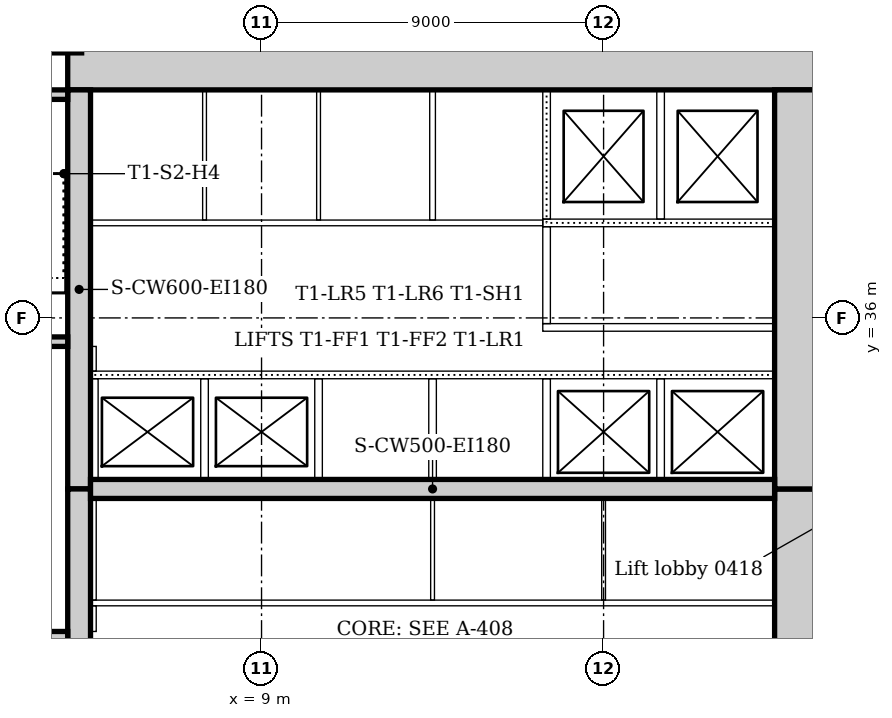
"""IFC4 building model, lengths in metres.
Left out: names, types, materials, properties, quantities, classifications, styles, units other than length and angle.
Written with IfcOpenShell. Run it as: python <this file> out.ifc"""

import sys

from ifc_helpers import new_model, si_unit, direction, frame, frame_2d, origin, origin_2d, place, context, subcontext, project, spatial, rectangle, extrude, element, fill, save


model = new_model("IFC4")
c1 = context("Model", 3, precision=1e-05, world=origin(), true_north=direction((0.0, 1.0)))
c2 = subcontext(c1, "Body", "Model", "MODEL_VIEW")
j1 = project(units=[si_unit("LENGTHUNIT", "METRE"), si_unit("PLANEANGLEUNIT", "RADIAN")], contexts=[c1])
p1 = place(None, origin())
s1 = spatial("IfcSite", under=j1, at=p1, CompositionType="ELEMENT")
p2 = place(p1, origin())
s2 = spatial("IfcBuilding", under=s1, at=p2, CompositionType="ELEMENT")
p3 = place(p2, frame((0.0, 0.0, 21.0)))
s3 = spatial("IfcBuildingStorey", under=s2, at=p3, CompositionType="ELEMENT", Elevation=21.0)
p4 = place(p3, frame((23.7, 42.6, 0.0), z_axis=(0.0, 0.0, 1.0), x_axis=(-1.0, 0.0, 0.0)))
e1 = element("IfcWall", 1, at=p4, inside=s3, PredefinedType="SOLIDWALL", context=c2, shape_type="SweptSolid", body=[
    extrude(rectangle(XDim=19.8, YDim=1.2, at=frame_2d((9.9, 0.0))), origin(), (0.0, 0.0, 1.0), 5.0),
])
p5 = place(p3, frame((23.1, 21.0, 0.0), z_axis=(0.0, 0.0, 1.0), x_axis=(0.0, 1.0, 0.0)))
e2 = element("IfcWall", 2, at=p5, inside=s3, PredefinedType="SOLIDWALL", context=c2, shape_type="SweptSolid", body=[
    extrude(rectangle(XDim=10.5, YDim=1.2, at=frame_2d((5.25, 0.0))), origin(), (0.0, 0.0, 1.0), 5.0),
])
p6 = place(p5, frame((4.35, 0.0, 0.0)))
e3 = element("IfcOpeningElement", 3, at=p6, cuts=e2, PredefinedType="OPENING", context=c2, shape_type="SweptSolid", body=[
    extrude(rectangle(XDim=1.8, YDim=2.1, at=frame_2d((0.9, 1.05))), frame((0.0, 0.61, 0.0), z_axis=(0.0, -1.0, 0.0), x_axis=(1.0, 0.0, 0.0)), (0.0, 0.0, 1.0), 1.22),
])
p7 = place(p3, frame((23.1, 31.5, 0.0), z_axis=(0.0, 0.0, 1.0), x_axis=(0.0, 1.0, 0.0)))
e4 = element("IfcWall", 4, at=p7, inside=s3, PredefinedType="SOLIDWALL", context=c2, shape_type="SweptSolid", body=[
    extrude(rectangle(XDim=10.5, YDim=1.2, at=frame_2d((5.25, 0.0))), origin(), (0.0, 0.0, 1.0), 5.0),
])
p8 = place(p7, frame((3.15, 0.0, 0.0)))
e5 = element("IfcOpeningElement", 5, at=p8, cuts=e4, PredefinedType="OPENING", context=c2, shape_type="SweptSolid", body=[
    extrude(rectangle(XDim=1.0, YDim=2.1, at=frame_2d((0.5, 1.05))), frame((0.0, 0.61, 0.0), z_axis=(0.0, -1.0, 0.0), x_axis=(1.0, 0.0, 0.0)), (0.0, 0.0, 1.0), 1.22),
])
p9 = place(p7, frame((5.2, 0.0, 0.0)))
e6 = element("IfcOpeningElement", 6, at=p9, cuts=e4, PredefinedType="OPENING", context=c2, shape_type="SweptSolid", body=[
    extrude(rectangle(XDim=1.0, YDim=2.1, at=frame_2d((0.5, 1.05))), frame((0.0, 0.61, 0.0), z_axis=(0.0, -1.0, 0.0), x_axis=(1.0, 0.0, 0.0)), (0.0, 0.0, 1.0), 1.22),
])
p10 = place(p3, frame((4.2, 42.0, 0.0), z_axis=(0.0, 0.0, 1.0), x_axis=(0.0, -1.0, 0.0)))
e7 = element("IfcWall", 7, at=p10, inside=s3, PredefinedType="SOLIDWALL", context=c2, shape_type="SweptSolid", body=[
    extrude(rectangle(XDim=10.5, YDim=0.6, at=frame_2d((5.25, 0.0))), origin(), (0.0, 0.0, 1.0), 5.0),
])
p11 = place(p10, frame((5.3, 0.0, 0.0)))
e8 = element("IfcOpeningElement", 8, at=p11, cuts=e7, PredefinedType="OPENING", context=c2, shape_type="SweptSolid", body=[
    extrude(rectangle(XDim=1.0, YDim=2.1, at=frame_2d((0.5, 1.05))), frame((0.0, 0.31, 0.0), z_axis=(0.0, -1.0, 0.0), x_axis=(1.0, 0.0, 0.0)), (0.0, 0.0, 1.0), 0.62),
])
p12 = place(p3, frame((4.2, 31.5, 0.0), z_axis=(0.0, 0.0, 1.0), x_axis=(0.0, -1.0, 0.0)))
e9 = element("IfcWall", 9, at=p12, inside=s3, PredefinedType="SOLIDWALL", context=c2, shape_type="SweptSolid", body=[
    extrude(rectangle(XDim=10.5, YDim=0.6, at=frame_2d((5.25, 0.0))), origin(), (0.0, 0.0, 1.0), 5.0),
])
p13 = place(p12, frame((4.25, 0.0, 0.0)))
e10 = element("IfcOpeningElement", 10, at=p13, cuts=e9, PredefinedType="OPENING", context=c2, shape_type="SweptSolid", body=[
    extrude(rectangle(XDim=1.0, YDim=2.1, at=frame_2d((0.5, 1.05))), frame((0.0, 0.31, 0.0), z_axis=(0.0, -1.0, 0.0), x_axis=(1.0, 0.0, 0.0)), (0.0, 0.0, 1.0), 0.62),
])
p14 = place(p3, frame((4.5, 31.5, 0.0), z_axis=(0.0, 0.0, 1.0), x_axis=(1.0, 0.0, 0.0)))
e11 = element("IfcWall", 11, at=p14, inside=s3, PredefinedType="SOLIDWALL", context=c2, shape_type="SweptSolid", body=[
    extrude(rectangle(XDim=18.0, YDim=0.5, at=frame_2d((9.0, 0.0))), origin(), (0.0, 0.0, 1.0), 5.0),
])
p15 = place(p3, frame((3.9, 27.625, 0.0), z_axis=(0.0, 0.0, 1.0), x_axis=(-1.0, 0.0, 0.0)))
e12 = element("IfcWall", 12, at=p15, inside=s3, PredefinedType="SOLIDWALL", context=c2, shape_type="SweptSolid", body=[
    extrude(rectangle(XDim=3.54, YDim=0.25, at=frame_2d((1.77, 0.0))), origin(), (0.0, 0.0, 1.0), 5.0),
])
p16 = place(p15, frame((0.4, 0.0, 0.0)))
e13 = element("IfcOpeningElement", 13, at=p16, cuts=e12, PredefinedType="OPENING", context=c2, shape_type="SweptSolid", body=[
    extrude(rectangle(XDim=1.0, YDim=2.1, at=frame_2d((0.5, 1.05))), frame((0.0, 0.135, 0.0), z_axis=(0.0, -1.0, 0.0), x_axis=(1.0, 0.0, 0.0)), (0.0, 0.0, 1.0), 0.27),
])
p17 = place(p3, frame((0.36, 35.375, 0.0), z_axis=(0.0, 0.0, 1.0), x_axis=(1.0, 0.0, 0.0)))
e14 = element("IfcWall", 14, at=p17, inside=s3, PredefinedType="SOLIDWALL", context=c2, shape_type="SweptSolid", body=[
    extrude(rectangle(XDim=3.54, YDim=0.25, at=frame_2d((1.77, 0.0))), origin(), (0.0, 0.0, 1.0), 5.0),
])
p18 = place(p17, frame((2.14, 0.0, 0.0)))
e15 = element("IfcOpeningElement", 15, at=p18, cuts=e14, PredefinedType="OPENING", context=c2, shape_type="SweptSolid", body=[
    extrude(rectangle(XDim=1.0, YDim=2.1, at=frame_2d((0.5, 1.05))), frame((0.0, 0.135, 0.0), z_axis=(0.0, -1.0, 0.0), x_axis=(1.0, 0.0, 0.0)), (0.0, 0.0, 1.0), 0.27),
])
p19 = place(p3, frame((3.9, 41.875, 0.0), z_axis=(0.0, 0.0, 1.0), x_axis=(-1.0, 0.0, 0.0)))
e16 = element("IfcWall", 16, at=p19, inside=s3, PredefinedType="SOLIDWALL", context=c2, shape_type="SweptSolid", body=[
    extrude(rectangle(XDim=3.54, YDim=0.25, at=frame_2d((1.77, 0.0))), origin(), (0.0, 0.0, 1.0), 5.0),
])
p20 = place(p3, frame((3.667, 43.574, 0.0), z_axis=(0.0, 0.0, 1.0), x_axis=(1.0, 0.0, 0.0)))
e17 = element("IfcColumn", 17, at=p20, inside=s3, PredefinedType="COLUMN", context=c2, shape_type="SweptSolid", body=[
    extrude(rectangle(XDim=1.2, YDim=1.2, at=origin_2d()), origin(), (0.0, 0.0, 1.0), 4.85),
])
p21 = place(p3, frame((16.4, 35.75, 0.0), z_axis=(0.0, 0.0, 1.0), x_axis=(1.0, 0.0, 0.0)))
e18 = element("IfcWall", 18, at=p21, inside=s3, PredefinedType="PARTITIONING", context=c2, shape_type="SweptSolid", body=[
    extrude(rectangle(XDim=6.1, YDim=0.2, at=frame_2d((3.05, 0.0))), origin(), (0.0, 0.0, 1.0), 4.85),
])
p22 = place(p3, frame((16.4, 38.5, 0.0), z_axis=(0.0, 0.0, 1.0), x_axis=(1.0, 0.0, 0.0)))
e19 = element("IfcWall", 19, at=p22, inside=s3, PredefinedType="PARTITIONING", context=c2, shape_type="SweptSolid", body=[
    extrude(rectangle(XDim=6.1, YDim=0.2, at=frame_2d((3.05, 0.0))), origin(), (0.0, 0.0, 1.0), 4.85),
])
p23 = place(p22, frame((1.0, 0.0, 0.0)))
e20 = element("IfcOpeningElement", 20, at=p23, cuts=e19, PredefinedType="OPENING", context=c2, shape_type="SweptSolid", body=[
    extrude(rectangle(XDim=1.2, YDim=2.1, at=frame_2d((0.6, 1.05))), frame((0.0, 0.11, 0.0), z_axis=(0.0, -1.0, 0.0), x_axis=(1.0, 0.0, 0.0)), (0.0, 0.0, 1.0), 0.22),
])
p24 = place(p22, frame((4.0, 0.0, 0.0)))
e21 = element("IfcOpeningElement", 21, at=p24, cuts=e19, PredefinedType="OPENING", context=c2, shape_type="SweptSolid", body=[
    extrude(rectangle(XDim=1.2, YDim=2.1, at=frame_2d((0.6, 1.05))), frame((0.0, 0.11, 0.0), z_axis=(0.0, -1.0, 0.0), x_axis=(1.0, 0.0, 0.0)), (0.0, 0.0, 1.0), 0.22),
])
p25 = place(p3, frame((16.5, 35.85, 0.0), z_axis=(0.0, 0.0, 1.0), x_axis=(0.0, 1.0, 0.0)))
e22 = element("IfcWall", 22, at=p25, inside=s3, PredefinedType="PARTITIONING", context=c2, shape_type="SweptSolid", body=[
    extrude(rectangle(XDim=2.55, YDim=0.2, at=frame_2d((1.275, 0.0))), origin(), (0.0, 0.0, 1.0), 4.85),
])
p26 = place(p3, frame((4.5, 34.5, 0.0), z_axis=(0.0, 0.0, 1.0), x_axis=(1.0, 0.0, 0.0)))
e23 = element("IfcWall", 23, at=p26, inside=s3, PredefinedType="PARTITIONING", context=c2, shape_type="SweptSolid", body=[
    extrude(rectangle(XDim=18.0, YDim=0.2, at=frame_2d((9.0, 0.0))), origin(), (0.0, 0.0, 1.0), 4.85),
])
p27 = place(p26, frame((0.95, 0.0, 0.0)))
e24 = element("IfcOpeningElement", 24, at=p27, cuts=e23, PredefinedType="OPENING", context=c2, shape_type="SweptSolid", body=[
    extrude(rectangle(XDim=1.1, YDim=2.1, at=frame_2d((0.55, 1.05))), frame((0.0, 0.11, 0.0), z_axis=(0.0, -1.0, 0.0), x_axis=(1.0, 0.0, 0.0)), (0.0, 0.0, 1.0), 0.22),
])
p28 = place(p26, frame((3.95, 0.0, 0.0)))
e25 = element("IfcOpeningElement", 25, at=p28, cuts=e23, PredefinedType="OPENING", context=c2, shape_type="SweptSolid", body=[
    extrude(rectangle(XDim=1.1, YDim=2.1, at=frame_2d((0.55, 1.05))), frame((0.0, 0.11, 0.0), z_axis=(0.0, -1.0, 0.0), x_axis=(1.0, 0.0, 0.0)), (0.0, 0.0, 1.0), 0.22),
])
p29 = place(p26, frame((12.95, 0.0, 0.0)))
e26 = element("IfcOpeningElement", 26, at=p29, cuts=e23, PredefinedType="OPENING", context=c2, shape_type="SweptSolid", body=[
    extrude(rectangle(XDim=1.1, YDim=2.1, at=frame_2d((0.55, 1.05))), frame((0.0, 0.11, 0.0), z_axis=(0.0, -1.0, 0.0), x_axis=(1.0, 0.0, 0.0)), (0.0, 0.0, 1.0), 0.22),
])
p30 = place(p26, frame((15.95, 0.0, 0.0)))
e27 = element("IfcOpeningElement", 27, at=p30, cuts=e23, PredefinedType="OPENING", context=c2, shape_type="SweptSolid", body=[
    extrude(rectangle(XDim=1.1, YDim=2.1, at=frame_2d((0.55, 1.05))), frame((0.0, 0.11, 0.0), z_axis=(0.0, -1.0, 0.0), x_axis=(1.0, 0.0, 0.0)), (0.0, 0.0, 1.0), 0.22),
])
for number, where, z_axis, x_axis in (
    (28, (16.5, 38.6, 0.0), (0.0, 0.0, 1.0), (0.0, 1.0, 0.0)),
    (29, (19.5, 38.6, 0.0), (0.0, 0.0, 1.0), (0.0, 1.0, 0.0)),
):
    element("IfcWall", number, at=place(p3, frame(where, z_axis=z_axis, x_axis=x_axis)), inside=s3, PredefinedType="PARTITIONING", context=c2, shape_type="SweptSolid", body=[
        extrude(rectangle(XDim=3.4, YDim=0.2, at=frame_2d((1.7, 0.0))), origin(), (0.0, 0.0, 1.0), 4.85),
    ])
for number, where, z_axis, x_axis in (
    (30, (4.6, 31.75, 0.0), (0.0, 0.0, 1.0), (0.0, 1.0, 0.0)),
    (31, (7.5, 31.75, 0.0), (0.0, 0.0, 1.0), (0.0, 1.0, 0.0)),
    (32, (10.5, 31.75, 0.0), (0.0, 0.0, 1.0), (0.0, 1.0, 0.0)),
    (33, (13.5, 31.75, 0.0), (0.0, 0.0, 1.0), (0.0, 1.0, 0.0)),
    (34, (16.5, 31.75, 0.0), (0.0, 0.0, 1.0), (0.0, 1.0, 0.0)),
    (35, (19.5, 31.75, 0.0), (0.0, 0.0, 1.0), (0.0, 1.0, 0.0)),
):
    element("IfcWall", number, at=place(p3, frame(where, z_axis=z_axis, x_axis=x_axis)), inside=s3, PredefinedType="PARTITIONING", context=c2, shape_type="SweptSolid", body=[
        extrude(rectangle(XDim=2.65, YDim=0.2, at=frame_2d((1.325, 0.0))), origin(), (0.0, 0.0, 1.0), 4.85),
    ])
p31 = place(p3, frame((4.5, 28.5, 0.0), z_axis=(0.0, 0.0, 1.0), x_axis=(1.0, 0.0, 0.0)))
e36 = element("IfcWall", 36, at=p31, inside=s3, PredefinedType="PARTITIONING", context=c2, shape_type="SweptSolid", body=[
    extrude(rectangle(XDim=18.0, YDim=0.15, at=frame_2d((9.0, 0.0))), origin(), (0.0, 0.0, 1.0), 4.85),
])
p32 = place(p31, frame((4.1, 0.0, 0.0)))
e37 = element("IfcOpeningElement", 37, at=p32, cuts=e36, PredefinedType="OPENING", context=c2, shape_type="SweptSolid", body=[
    extrude(rectangle(XDim=0.9, YDim=2.1, at=frame_2d((0.45, 1.05))), frame((0.0, 0.085, 0.0), z_axis=(0.0, -1.0, 0.0), x_axis=(1.0, 0.0, 0.0)), (0.0, 0.0, 1.0), 0.17),
])
p33 = place(p31, frame((10.8, 0.0, 0.0)))
e38 = element("IfcOpeningElement", 38, at=p33, cuts=e36, PredefinedType="OPENING", context=c2, shape_type="SweptSolid", body=[
    extrude(rectangle(XDim=0.9, YDim=2.1, at=frame_2d((0.45, 1.05))), frame((0.0, 0.085, 0.0), z_axis=(0.0, -1.0, 0.0), x_axis=(1.0, 0.0, 0.0)), (0.0, 0.0, 1.0), 0.17),
])
p34 = place(p31, frame((15.2, 0.0, 0.0)))
e39 = element("IfcOpeningElement", 39, at=p34, cuts=e36, PredefinedType="OPENING", context=c2, shape_type="SweptSolid", body=[
    extrude(rectangle(XDim=0.9, YDim=2.1, at=frame_2d((0.45, 1.05))), frame((0.0, 0.085, 0.0), z_axis=(0.0, -1.0, 0.0), x_axis=(1.0, 0.0, 0.0)), (0.0, 0.0, 1.0), 0.17),
])
p35 = place(p3, frame((4.5, 38.5, 0.0), z_axis=(0.0, 0.0, 1.0), x_axis=(1.0, 0.0, 0.0)))
e40 = element("IfcWall", 40, at=p35, inside=s3, PredefinedType="PARTITIONING", context=c2, shape_type="SweptSolid", body=[
    extrude(rectangle(XDim=11.9, YDim=0.15, at=frame_2d((5.95, 0.0))), origin(), (0.0, 0.0, 1.0), 4.85),
])
p36 = place(p35, frame((1.1, 0.0, 0.0)))
e41 = element("IfcOpeningElement", 41, at=p36, cuts=e40, PredefinedType="OPENING", context=c2, shape_type="SweptSolid", body=[
    extrude(rectangle(XDim=0.9, YDim=2.1, at=frame_2d((0.45, 1.05))), frame((0.0, 0.085, 0.0), z_axis=(0.0, -1.0, 0.0), x_axis=(1.0, 0.0, 0.0)), (0.0, 0.0, 1.0), 0.17),
])
p37 = place(p35, frame((4.05, 0.0, 0.0)))
e42 = element("IfcOpeningElement", 42, at=p37, cuts=e40, PredefinedType="OPENING", context=c2, shape_type="SweptSolid", body=[
    extrude(rectangle(XDim=0.9, YDim=2.1, at=frame_2d((0.45, 1.05))), frame((0.0, 0.085, 0.0), z_axis=(0.0, -1.0, 0.0), x_axis=(1.0, 0.0, 0.0)), (0.0, 0.0, 1.0), 0.17),
])
p38 = place(p35, frame((7.05, 0.0, 0.0)))
e43 = element("IfcOpeningElement", 43, at=p38, cuts=e40, PredefinedType="OPENING", context=c2, shape_type="SweptSolid", body=[
    extrude(rectangle(XDim=0.9, YDim=2.1, at=frame_2d((0.45, 1.05))), frame((0.0, 0.085, 0.0), z_axis=(0.0, -1.0, 0.0), x_axis=(1.0, 0.0, 0.0)), (0.0, 0.0, 1.0), 0.17),
])
p39 = place(p35, frame((9.95, 0.0, 0.0)))
e44 = element("IfcOpeningElement", 44, at=p39, cuts=e40, PredefinedType="OPENING", context=c2, shape_type="SweptSolid", body=[
    extrude(rectangle(XDim=0.8, YDim=2.1, at=frame_2d((0.4, 1.05))), frame((0.0, 0.085, 0.0), z_axis=(0.0, -1.0, 0.0), x_axis=(1.0, 0.0, 0.0)), (0.0, 0.0, 1.0), 0.17),
])
p40 = place(p3, frame((4.575, 27.75, 0.0), z_axis=(0.0, 0.0, 1.0), x_axis=(0.0, 1.0, 0.0)))
e45 = element("IfcWall", 45, at=p40, inside=s3, PredefinedType="PARTITIONING", context=c2, shape_type="SweptSolid", body=[
    extrude(rectangle(XDim=0.675, YDim=0.15, at=frame_2d((0.338, 0.0))), origin(), (0.0, 0.0, 1.0), 4.85),
])
p41 = place(p3, frame((4.575, 28.575, 0.0), z_axis=(0.0, 0.0, 1.0), x_axis=(0.0, 1.0, 0.0)))
e46 = element("IfcWall", 46, at=p41, inside=s3, PredefinedType="PARTITIONING", context=c2, shape_type="SweptSolid", body=[
    extrude(rectangle(XDim=2.675, YDim=0.15, at=frame_2d((1.337, 0.0))), origin(), (0.0, 0.0, 1.0), 4.85),
])
p42 = place(p3, frame((4.575, 34.6, 0.0), z_axis=(0.0, 0.0, 1.0), x_axis=(0.0, 1.0, 0.0)))
e47 = element("IfcWall", 47, at=p42, inside=s3, PredefinedType="PARTITIONING", context=c2, shape_type="SweptSolid", body=[
    extrude(rectangle(XDim=0.65, YDim=0.15, at=frame_2d((0.325, 0.0))), origin(), (0.0, 0.0, 1.0), 4.85),
])
p43 = place(p3, frame((13.5, 38.575, 0.0), z_axis=(0.0, 0.0, 1.0), x_axis=(0.0, 1.0, 0.0)))
e48 = element("IfcWall", 48, at=p43, inside=s3, PredefinedType="PARTITIONING", context=c2, shape_type="SweptSolid", body=[
    extrude(rectangle(XDim=3.425, YDim=0.15, at=frame_2d((1.712, 0.0))), origin(), (0.0, 0.0, 1.0), 4.85),
])
for number, where, z_axis, x_axis in (
    (49, (7.5, 38.575, 0.0), (0.0, 0.0, 1.0), (0.0, 1.0, 0.0)),
    (50, (10.5, 38.575, 0.0), (0.0, 0.0, 1.0), (0.0, 1.0, 0.0)),
):
    element("IfcWall", number, at=place(p3, frame(where, z_axis=z_axis, x_axis=x_axis)), inside=s3, PredefinedType="PARTITIONING", context=c2, shape_type="SweptSolid", body=[
        extrude(rectangle(XDim=3.425, YDim=0.1, at=frame_2d((1.712, 0.0))), origin(), (0.0, 0.0, 1.0), 4.85),
    ])
for number, where, z_axis, x_axis in (
    (51, (13.5, 28.575, 0.0), (0.0, 0.0, 1.0), (0.0, 1.0, 0.0)),
    (52, (18.0, 28.575, 0.0), (0.0, 0.0, 1.0), (0.0, 1.0, 0.0)),
):
    element("IfcWall", number, at=place(p3, frame(where, z_axis=z_axis, x_axis=x_axis)), inside=s3, PredefinedType="PARTITIONING", context=c2, shape_type="SweptSolid", body=[
        extrude(rectangle(XDim=2.675, YDim=0.1, at=frame_2d((1.337, 0.0))), origin(), (0.0, 0.0, 1.0), 4.85),
    ])
p44 = place(p11, frame((1.0, 0.0, 0.0), z_axis=(0.0, 0.0, 1.0), x_axis=(-1.0, 0.0, 0.0)))
e53 = element("IfcDoor", 53, at=p44, inside=s3, OperationType="SINGLE_SWING_LEFT", PredefinedType="DOOR", context=c2, shape_type="SweptSolid", body=[
    extrude(rectangle(XDim=1.0, YDim=2.1, at=frame_2d((0.5, 1.05))), frame((0.0, 0.025, 0.0), z_axis=(0.0, -1.0, 0.0), x_axis=(1.0, 0.0, 0.0)), (0.0, 0.0, 1.0), 0.05),
])
fill(e8, e53)
p45 = place(p27, origin())
e54 = element("IfcDoor", 54, at=p45, inside=s3, OperationType="SLIDING_TO_LEFT", PredefinedType="DOOR", context=c2, shape_type="SweptSolid", body=[
    extrude(rectangle(XDim=1.1, YDim=2.1, at=frame_2d((0.55, 1.05))), frame((0.0, 0.025, 0.0), z_axis=(0.0, -1.0, 0.0), x_axis=(1.0, 0.0, 0.0)), (0.0, 0.0, 1.0), 0.05),
])
fill(e24, e54)
p46 = place(p28, origin())
e55 = element("IfcDoor", 55, at=p46, inside=s3, OperationType="SLIDING_TO_LEFT", PredefinedType="DOOR", context=c2, shape_type="SweptSolid", body=[
    extrude(rectangle(XDim=1.1, YDim=2.1, at=frame_2d((0.55, 1.05))), frame((0.0, 0.025, 0.0), z_axis=(0.0, -1.0, 0.0), x_axis=(1.0, 0.0, 0.0)), (0.0, 0.0, 1.0), 0.05),
])
fill(e25, e55)
p47 = place(p29, origin())
e56 = element("IfcDoor", 56, at=p47, inside=s3, OperationType="SLIDING_TO_LEFT", PredefinedType="DOOR", context=c2, shape_type="SweptSolid", body=[
    extrude(rectangle(XDim=1.1, YDim=2.1, at=frame_2d((0.55, 1.05))), frame((0.0, 0.025, 0.0), z_axis=(0.0, -1.0, 0.0), x_axis=(1.0, 0.0, 0.0)), (0.0, 0.0, 1.0), 0.05),
])
fill(e26, e56)
p48 = place(p30, origin())
e57 = element("IfcDoor", 57, at=p48, inside=s3, OperationType="SLIDING_TO_LEFT", PredefinedType="DOOR", context=c2, shape_type="SweptSolid", body=[
    extrude(rectangle(XDim=1.1, YDim=2.1, at=frame_2d((0.55, 1.05))), frame((0.0, 0.025, 0.0), z_axis=(0.0, -1.0, 0.0), x_axis=(1.0, 0.0, 0.0)), (0.0, 0.0, 1.0), 0.05),
])
fill(e27, e57)
p49 = place(p23, origin())
e58 = element("IfcDoor", 58, at=p49, inside=s3, OperationType="SLIDING_TO_LEFT", PredefinedType="DOOR", context=c2, shape_type="SweptSolid", body=[
    extrude(rectangle(XDim=1.2, YDim=2.1, at=frame_2d((0.6, 1.05))), frame((0.0, 0.025, 0.0), z_axis=(0.0, -1.0, 0.0), x_axis=(1.0, 0.0, 0.0)), (0.0, 0.0, 1.0), 0.05),
])
fill(e20, e58)
p50 = place(p24, origin())
e59 = element("IfcDoor", 59, at=p50, inside=s3, OperationType="SLIDING_TO_LEFT", PredefinedType="DOOR", context=c2, shape_type="SweptSolid", body=[
    extrude(rectangle(XDim=1.2, YDim=2.1, at=frame_2d((0.6, 1.05))), frame((0.0, 0.025, 0.0), z_axis=(0.0, -1.0, 0.0), x_axis=(1.0, 0.0, 0.0)), (0.0, 0.0, 1.0), 0.05),
])
fill(e21, e59)
p51 = place(p8, frame((1.0, 0.0, 0.0), z_axis=(0.0, 0.0, 1.0), x_axis=(-1.0, 0.0, 0.0)))
e60 = element("IfcDoor", 60, at=p51, inside=s3, OperationType="SINGLE_SWING_RIGHT", PredefinedType="DOOR", context=c2, shape_type="SweptSolid", body=[
    extrude(rectangle(XDim=1.0, YDim=2.1, at=frame_2d((0.5, 1.05))), frame((0.0, 0.025, 0.0), z_axis=(0.0, -1.0, 0.0), x_axis=(1.0, 0.0, 0.0)), (0.0, 0.0, 1.0), 0.05),
])
fill(e5, e60)
p52 = place(p9, frame((1.0, 0.0, 0.0), z_axis=(0.0, 0.0, 1.0), x_axis=(-1.0, 0.0, 0.0)))
e61 = element("IfcDoor", 61, at=p52, inside=s3, OperationType="SINGLE_SWING_LEFT", PredefinedType="DOOR", context=c2, shape_type="SweptSolid", body=[
    extrude(rectangle(XDim=1.0, YDim=2.1, at=frame_2d((0.5, 1.05))), frame((0.0, 0.025, 0.0), z_axis=(0.0, -1.0, 0.0), x_axis=(1.0, 0.0, 0.0)), (0.0, 0.0, 1.0), 0.05),
])
fill(e6, e61)
p53 = place(p32, origin())
e62 = element("IfcDoor", 62, at=p53, inside=s3, OperationType="SINGLE_SWING_LEFT", PredefinedType="DOOR", context=c2, shape_type="SweptSolid", body=[
    extrude(rectangle(XDim=0.9, YDim=2.1, at=frame_2d((0.45, 1.05))), frame((0.0, 0.025, 0.0), z_axis=(0.0, -1.0, 0.0), x_axis=(1.0, 0.0, 0.0)), (0.0, 0.0, 1.0), 0.05),
])
fill(e37, e62)
p54 = place(p33, origin())
e63 = element("IfcDoor", 63, at=p54, inside=s3, OperationType="SINGLE_SWING_RIGHT", PredefinedType="DOOR", context=c2, shape_type="SweptSolid", body=[
    extrude(rectangle(XDim=0.9, YDim=2.1, at=frame_2d((0.45, 1.05))), frame((0.0, 0.025, 0.0), z_axis=(0.0, -1.0, 0.0), x_axis=(1.0, 0.0, 0.0)), (0.0, 0.0, 1.0), 0.05),
])
fill(e38, e63)
p55 = place(p34, origin())
e64 = element("IfcDoor", 64, at=p55, inside=s3, OperationType="SINGLE_SWING_RIGHT", PredefinedType="DOOR", context=c2, shape_type="SweptSolid", body=[
    extrude(rectangle(XDim=0.9, YDim=2.1, at=frame_2d((0.45, 1.05))), frame((0.0, 0.025, 0.0), z_axis=(0.0, -1.0, 0.0), x_axis=(1.0, 0.0, 0.0)), (0.0, 0.0, 1.0), 0.05),
])
fill(e39, e64)
p56 = place(p36, origin())
e65 = element("IfcDoor", 65, at=p56, inside=s3, OperationType="SINGLE_SWING_RIGHT", PredefinedType="DOOR", context=c2, shape_type="SweptSolid", body=[
    extrude(rectangle(XDim=0.9, YDim=2.1, at=frame_2d((0.45, 1.05))), frame((0.0, 0.025, 0.0), z_axis=(0.0, -1.0, 0.0), x_axis=(1.0, 0.0, 0.0)), (0.0, 0.0, 1.0), 0.05),
])
fill(e41, e65)
p57 = place(p37, origin())
e66 = element("IfcDoor", 66, at=p57, inside=s3, OperationType="SINGLE_SWING_LEFT", PredefinedType="DOOR", context=c2, shape_type="SweptSolid", body=[
    extrude(rectangle(XDim=0.9, YDim=2.1, at=frame_2d((0.45, 1.05))), frame((0.0, 0.025, 0.0), z_axis=(0.0, -1.0, 0.0), x_axis=(1.0, 0.0, 0.0)), (0.0, 0.0, 1.0), 0.05),
])
fill(e42, e66)
p58 = place(p38, origin())
e67 = element("IfcDoor", 67, at=p58, inside=s3, OperationType="SINGLE_SWING_LEFT", PredefinedType="DOOR", context=c2, shape_type="SweptSolid", body=[
    extrude(rectangle(XDim=0.9, YDim=2.1, at=frame_2d((0.45, 1.05))), frame((0.0, 0.025, 0.0), z_axis=(0.0, -1.0, 0.0), x_axis=(1.0, 0.0, 0.0)), (0.0, 0.0, 1.0), 0.05),
])
fill(e43, e67)
p59 = place(p39, origin())
e68 = element("IfcDoor", 68, at=p59, inside=s3, OperationType="SINGLE_SWING_RIGHT", PredefinedType="DOOR", context=c2, shape_type="SweptSolid", body=[
    extrude(rectangle(XDim=0.8, YDim=2.1, at=frame_2d((0.4, 1.05))), frame((0.0, 0.025, 0.0), z_axis=(0.0, -1.0, 0.0), x_axis=(1.0, 0.0, 0.0)), (0.0, 0.0, 1.0), 0.05),
])
fill(e44, e68)
save(model, sys.argv[1])
